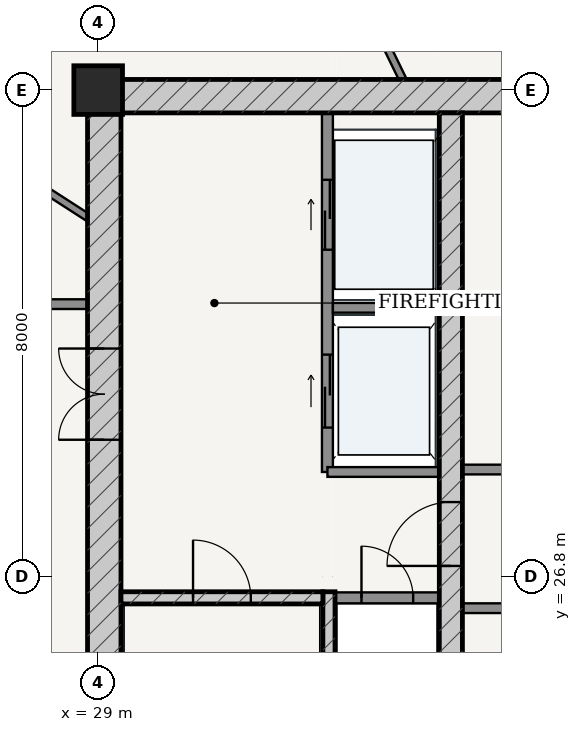
"""IFC4 building model, lengths in metres.
Left out: names, types, materials, properties, quantities, classifications, styles, units other than length and angle.
Written with IfcOpenShell. Run it as: python <this file> out.ifc"""

import sys

from ifc_helpers import new_model, si_unit, direction, frame, frame_2d, origin, origin_2d, place, context, subcontext, project, spatial, rectangle, extrude, source, transform, mapped, element, fill, save


model = new_model("IFC4")
c1 = context("Model", 3, precision=1e-05, world=origin(), true_north=direction((-0.2419218956, 0.970295726276)))
c2 = subcontext(c1, "Body", "Model", "MODEL_VIEW")
j1 = project(units=[si_unit("LENGTHUNIT", "METRE"), si_unit("PLANEANGLEUNIT", "RADIAN")], contexts=[c1])
p1 = place(None, origin())
s1 = spatial("IfcSite", under=j1, at=p1, CompositionType="ELEMENT")
p2 = place(p1, origin())
s2 = spatial("IfcBuilding", under=s1, at=p2, CompositionType="ELEMENT")
p3 = place(p2, frame((0.0, 0.0, 278.2)))
s3 = spatial("IfcBuildingStorey", under=s2, at=p3, CompositionType="ELEMENT", Elevation=278.2)
p4 = place(p3, frame((29.0, 34.8, 0.0), z_axis=(0.0, 0.0, 1.0), x_axis=(1.0, 0.0, 0.0)))
e1 = element("IfcColumn", 1, at=p4, inside=s3, PredefinedType="COLUMN", context=c2, shape_type="SweptSolid", body=[
    extrude(rectangle(XDim=0.8, YDim=0.8, at=origin_2d()), origin(), (0.0, 0.0, 1.0), 3.75),
])
p5 = place(p3, frame((28.825, 34.7, 0.0), z_axis=(0.0, 0.0, 1.0), x_axis=(1.0, 0.0, 0.0)))
e2 = element("IfcWall", 2, at=p5, inside=s3, PredefinedType="SHEAR", context=c2, shape_type="SweptSolid", body=[
    extrude(rectangle(XDim=18.35, YDim=0.55, at=frame_2d((9.175, 0.0))), origin(), (0.0, 0.0, 1.0), 3.49),
])
p6 = place(p3, frame((29.1, 19.175, 0.0), z_axis=(0.0, 0.0, 1.0), x_axis=(0.0, 1.0, 0.0)))
e3 = element("IfcWall", 3, at=p6, inside=s3, PredefinedType="SHEAR", context=c2, shape_type="SweptSolid", body=[
    extrude(rectangle(XDim=15.25, YDim=0.55, at=frame_2d((7.625, 0.0))), origin(), (0.0, 0.0, 1.0), 3.49),
])
p7 = place(p6, frame((9.875, 0.0, 0.0)))
e4 = element("IfcOpeningElement", 4, at=p7, cuts=e3, PredefinedType="OPENING", context=c2, shape_type="SweptSolid", body=[
    extrude(rectangle(XDim=1.5, YDim=2.2, at=frame_2d((0.75, 1.1))), frame((0.0, 0.285, 0.0), z_axis=(0.0, -1.0, 0.0), x_axis=(1.0, 0.0, 0.0)), (0.0, 0.0, 1.0), 0.57),
])
p8 = place(p3, frame((32.795, 19.175, 0.0), z_axis=(0.0, 0.0, 1.0), x_axis=(0.0, 1.0, 0.0)))
e5 = element("IfcWall", 5, at=p8, inside=s3, PredefinedType="SOLIDWALL", context=c2, shape_type="SweptSolid", body=[
    extrude(rectangle(XDim=7.375, YDim=0.2, at=frame_2d((3.688, 0.0))), origin(), (0.0, 0.0, 1.0), 3.49),
])
p9 = place(p3, frame((29.375, 26.45, 0.0), z_axis=(0.0, 0.0, 1.0), x_axis=(1.0, 0.0, 0.0)))
e6 = element("IfcWall", 6, at=p9, inside=s3, PredefinedType="SOLIDWALL", context=c2, shape_type="SweptSolid", body=[
    extrude(rectangle(XDim=3.32, YDim=0.2, at=frame_2d((1.66, 0.0))), origin(), (0.0, 0.0, 1.0), 3.49),
])
p10 = place(p9, frame((1.185, 0.0, 0.0)))
e7 = element("IfcOpeningElement", 7, at=p10, cuts=e6, PredefinedType="OPENING", context=c2, shape_type="SweptSolid", body=[
    extrude(rectangle(XDim=0.95, YDim=2.15, at=frame_2d((0.475, 1.075))), frame((0.0, 0.11, 0.0), z_axis=(0.0, -1.0, 0.0), x_axis=(1.0, 0.0, 0.0)), (0.0, 0.0, 1.0), 0.22),
])
p11 = place(p3, frame((34.8, 19.175, 0.0), z_axis=(0.0, 0.0, 1.0), x_axis=(0.0, 1.0, 0.0)))
e8 = element("IfcWall", 8, at=p11, inside=s3, PredefinedType="SHEAR", context=c2, shape_type="SweptSolid", body=[
    extrude(rectangle(XDim=15.25, YDim=0.38, at=frame_2d((7.625, 0.0))), origin(), (0.0, 0.0, 1.0), 3.49),
])
p12 = place(p11, frame((7.8, 0.0, 0.0)))
e9 = element("IfcOpeningElement", 9, at=p12, cuts=e8, PredefinedType="OPENING", context=c2, shape_type="SweptSolid", body=[
    extrude(rectangle(XDim=1.05, YDim=2.15, at=frame_2d((0.525, 1.075))), frame((0.0, 0.2, 0.0), z_axis=(0.0, -1.0, 0.0), x_axis=(1.0, 0.0, 0.0)), (0.0, 0.0, 1.0), 0.4),
])
p13 = place(p3, frame((32.9, 26.45, 0.0), z_axis=(0.0, 0.0, 1.0), x_axis=(1.0, 0.0, 0.0)))
e10 = element("IfcWall", 10, at=p13, inside=s3, PredefinedType="PARTITIONING", context=c2, shape_type="SweptSolid", body=[
    extrude(rectangle(XDim=1.71, YDim=0.18, at=frame_2d((0.855, 0.0))), origin(), (0.0, 0.0, 1.0), 3.49),
])
p14 = place(p13, frame((0.43, 0.0, 0.0)))
e11 = element("IfcOpeningElement", 11, at=p14, cuts=e10, PredefinedType="OPENING", context=c2, shape_type="SweptSolid", body=[
    extrude(rectangle(XDim=0.85, YDim=2.1, at=frame_2d((0.425, 1.05))), frame((0.0, 0.1, 0.0), z_axis=(0.0, -1.0, 0.0), x_axis=(1.0, 0.0, 0.0)), (0.0, 0.0, 1.0), 0.2),
])
p15 = place(p3, frame((32.77, 28.52, 0.0), z_axis=(0.0, 0.0, 1.0), x_axis=(0.0, 1.0, 0.0)))
e12 = element("IfcWall", 12, at=p15, inside=s3, PredefinedType="PARTITIONING", context=c2, shape_type="SweptSolid", body=[
    extrude(rectangle(XDim=5.905, YDim=0.18, at=frame_2d((2.953, 0.0))), origin(), (0.0, 0.0, 1.0), 3.49),
])
p16 = place(p15, frame((3.655, 0.0, 0.0)))
e13 = element("IfcOpeningElement", 13, at=p16, cuts=e12, PredefinedType="OPENING", context=c2, shape_type="SweptSolid", body=[
    extrude(rectangle(XDim=1.15, YDim=2.2, at=frame_2d((0.575, 1.1))), frame((0.0, 0.1, 0.0), z_axis=(0.0, -1.0, 0.0), x_axis=(1.0, 0.0, 0.0)), (0.0, 0.0, 1.0), 0.2),
])
p17 = place(p15, frame((0.73, 0.0, 0.0)))
e14 = element("IfcOpeningElement", 14, at=p17, cuts=e12, PredefinedType="OPENING", context=c2, shape_type="SweptSolid", body=[
    extrude(rectangle(XDim=1.2, YDim=2.25, at=frame_2d((0.6, 1.125))), frame((0.0, 0.1, 0.0), z_axis=(0.0, -1.0, 0.0), x_axis=(1.0, 0.0, 0.0)), (0.0, 0.0, 1.0), 0.2),
])
p18 = place(p3, frame((32.86, 31.22, 0.0), z_axis=(0.0, 0.0, 1.0), x_axis=(1.0, 0.0, 0.0)))
e15 = element("IfcWall", 15, at=p18, inside=s3, PredefinedType="PARTITIONING", context=c2, shape_type="SweptSolid", body=[
    extrude(rectangle(XDim=1.75, YDim=0.16, at=frame_2d((0.875, 0.0))), origin(), (0.0, 0.0, 1.0), 3.49),
])
p19 = place(p3, frame((32.77, 28.52, 0.0), z_axis=(0.0, 0.0, 1.0), x_axis=(1.0, 0.0, 0.0)))
e16 = element("IfcWall", 16, at=p19, inside=s3, PredefinedType="PARTITIONING", context=c2, shape_type="SweptSolid", body=[
    extrude(rectangle(XDim=1.84, YDim=0.16, at=frame_2d((0.92, 0.0))), origin(), (0.0, 0.0, 1.0), 3.49),
])
p20 = place(p3, frame((34.99, 28.56, 0.0), z_axis=(0.0, 0.0, 1.0), x_axis=(1.0, 0.0, 0.0)))
e17 = element("IfcWall", 17, at=p20, inside=s3, PredefinedType="PARTITIONING", context=c2, shape_type="SweptSolid", body=[
    extrude(rectangle(XDim=6.02, YDim=0.16, at=frame_2d((3.01, 0.0))), origin(), (0.0, 0.0, 1.0), 3.49),
])
p21 = place(p20, frame((1.025, 0.0, 0.0)))
e18 = element("IfcOpeningElement", 18, at=p21, cuts=e17, PredefinedType="OPENING", context=c2, shape_type="SweptSolid", body=[
    extrude(rectangle(XDim=0.86, YDim=2.1, at=frame_2d((0.43, 1.05))), frame((0.0, 0.09, 0.0), z_axis=(0.0, -1.0, 0.0), x_axis=(1.0, 0.0, 0.0)), (0.0, 0.0, 1.0), 0.18),
])
p22 = place(p20, frame((4.14, 0.0, 0.0)))
e19 = element("IfcOpeningElement", 19, at=p22, cuts=e17, PredefinedType="OPENING", context=c2, shape_type="SweptSolid", body=[
    extrude(rectangle(XDim=0.85, YDim=2.1, at=frame_2d((0.425, 1.05))), frame((0.0, 0.09, 0.0), z_axis=(0.0, -1.0, 0.0), x_axis=(1.0, 0.0, 0.0)), (0.0, 0.0, 1.0), 0.18),
])
p23 = place(p3, frame((34.99, 26.28, 0.0), z_axis=(0.0, 0.0, 1.0), x_axis=(1.0, 0.0, 0.0)))
e20 = element("IfcWall", 20, at=p23, inside=s3, PredefinedType="PARTITIONING", context=c2, shape_type="SweptSolid", body=[
    extrude(rectangle(XDim=6.02, YDim=0.16, at=frame_2d((3.01, 0.0))), origin(), (0.0, 0.0, 1.0), 3.49),
])
p24 = place(p23, frame((1.045, 0.0, 0.0)))
e21 = element("IfcOpeningElement", 21, at=p24, cuts=e20, PredefinedType="OPENING", context=c2, shape_type="SweptSolid", body=[
    extrude(rectangle(XDim=0.85, YDim=2.1, at=frame_2d((0.425, 1.05))), frame((0.0, 0.09, 0.0), z_axis=(0.0, -1.0, 0.0), x_axis=(1.0, 0.0, 0.0)), (0.0, 0.0, 1.0), 0.18),
])
p25 = place(p23, frame((3.215, 0.0, 0.0)))
e22 = element("IfcOpeningElement", 22, at=p25, cuts=e20, PredefinedType="OPENING", context=c2, shape_type="SweptSolid", body=[
    extrude(rectangle(XDim=1.1, YDim=2.2, at=frame_2d((0.55, 1.1))), frame((0.0, 0.09, 0.0), z_axis=(0.0, -1.0, 0.0), x_axis=(1.0, 0.0, 0.0)), (0.0, 0.0, 1.0), 0.18),
])
p26 = place(p23, frame((4.695, 0.0, 0.0)))
e23 = element("IfcOpeningElement", 23, at=p26, cuts=e20, PredefinedType="OPENING", context=c2, shape_type="SweptSolid", body=[
    extrude(rectangle(XDim=1.1, YDim=2.2, at=frame_2d((0.55, 1.1))), frame((0.0, 0.09, 0.0), z_axis=(0.0, -1.0, 0.0), x_axis=(1.0, 0.0, 0.0)), (0.0, 0.0, 1.0), 0.18),
])
p27 = place(p3, frame((26.895, 31.28, 0.0), z_axis=(0.0, 0.0, 1.0), x_axis=(1.0, 0.0, 0.0)))
e24 = element("IfcWall", 24, at=p27, inside=s3, PredefinedType="PARTITIONING", context=c2, shape_type="SweptSolid", body=[
    extrude(rectangle(XDim=1.93, YDim=0.16, at=frame_2d((0.965, 0.0))), origin(), (0.0, 0.0, 1.0), 3.49),
])
p28 = place(p3, frame((34.008, 34.977, 0.0), z_axis=(0.0, 0.0, 1.0), x_axis=(-0.438717914863, 0.898624833386, 0.0)))
e25 = element("IfcWall", 25, at=p28, inside=s3, PredefinedType="PARTITIONING", context=c2, shape_type="SweptSolid", body=[
    extrude(rectangle(XDim=3.007, YDim=0.12, at=frame_2d((1.504, 0.0))), origin(), (0.0, 0.0, 1.0), 3.49),
])
p29 = place(p28, frame((1.054, 0.0, 0.0)))
e26 = element("IfcOpeningElement", 26, at=p29, cuts=e25, PredefinedType="OPENING", context=c2, shape_type="SweptSolid", body=[
    extrude(rectangle(XDim=0.9, YDim=2.15, at=frame_2d((0.45, 1.075))), frame((0.0, 0.07, 0.0), z_axis=(0.0, -1.0, 0.0), x_axis=(1.0, 0.0, 0.0)), (0.0, 0.0, 1.0), 0.14),
])
p30 = place(p3, frame((28.825, 32.709, 0.0), z_axis=(0.0, 0.0, 1.0), x_axis=(-0.840692964871, 0.541512085568, 0.0)))
e27 = element("IfcWall", 27, at=p30, inside=s3, PredefinedType="PARTITIONING", context=c2, shape_type="SweptSolid", body=[
    extrude(rectangle(XDim=3.221, YDim=0.12, at=frame_2d((1.61, 0.0))), origin(), (0.0, 0.0, 1.0), 3.015),
])
p31 = place(p30, frame((1.18, 0.0, 0.0)))
e28 = element("IfcOpeningElement", 28, at=p31, cuts=e27, PredefinedType="OPENING", context=c2, shape_type="SweptSolid", body=[
    extrude(rectangle(XDim=0.86, YDim=2.15, at=frame_2d((0.43, 1.075))), frame((0.0, 0.07, 0.0), z_axis=(0.0, -1.0, 0.0), x_axis=(1.0, 0.0, 0.0)), (0.0, 0.0, 1.0), 0.14),
])
m1 = source(origin(), c2, "Body", "SweptSolid", [
    extrude(rectangle(XDim=1.5, YDim=2.2, at=frame_2d((0.75, 1.1))), frame((0.0, 0.025, 0.0), z_axis=(0.0, -1.0, 0.0), x_axis=(1.0, 0.0, 0.0)), (0.0, 0.0, 1.0), 0.05),
])
p32 = place(p7, origin())
e29 = element("IfcDoor", 29, at=p32, inside=s3, OperationType="DOUBLE_DOOR_SINGLE_SWING", PredefinedType="DOOR", context=c2, shape_type="MappedRepresentation", body=[
    mapped(m1, transform((0.0, 0.0, 0.0), scale=1.0)),
])
fill(e4, e29)
m2 = source(origin(), c2, "Body", "SweptSolid", [
    extrude(rectangle(XDim=1.05, YDim=2.15, at=frame_2d((0.525, 1.075))), frame((0.0, 0.025, 0.0), z_axis=(0.0, -1.0, 0.0), x_axis=(1.0, 0.0, 0.0)), (0.0, 0.0, 1.0), 0.05),
])
p33 = place(p12, origin())
e30 = element("IfcDoor", 30, at=p33, inside=s3, OperationType="SINGLE_SWING_LEFT", PredefinedType="DOOR", context=c2, shape_type="MappedRepresentation", body=[
    mapped(m2, transform((0.0, 0.0, 0.0), scale=1.0)),
])
fill(e9, e30)
m3 = source(origin(), c2, "Body", "SweptSolid", [
    extrude(rectangle(XDim=0.95, YDim=2.15, at=frame_2d((0.475, 1.075))), frame((0.0, 0.025, 0.0), z_axis=(0.0, -1.0, 0.0), x_axis=(1.0, 0.0, 0.0)), (0.0, 0.0, 1.0), 0.05),
])
p34 = place(p10, origin())
e31 = element("IfcDoor", 31, at=p34, inside=s3, OperationType="SINGLE_SWING_LEFT", PredefinedType="DOOR", context=c2, shape_type="MappedRepresentation", body=[
    mapped(m3, transform((0.0, 0.0, 0.0), scale=1.0)),
])
fill(e7, e31)
m4 = source(origin(), c2, "Body", "SweptSolid", [
    extrude(rectangle(XDim=0.85, YDim=2.1, at=frame_2d((0.425, 1.05))), frame((0.0, 0.025, 0.0), z_axis=(0.0, -1.0, 0.0), x_axis=(1.0, 0.0, 0.0)), (0.0, 0.0, 1.0), 0.05),
])
p35 = place(p14, origin())
e32 = element("IfcDoor", 32, at=p35, inside=s3, OperationType="SINGLE_SWING_LEFT", PredefinedType="DOOR", context=c2, shape_type="MappedRepresentation", body=[
    mapped(m4, transform((0.0, 0.0, 0.0), scale=1.0)),
])
fill(e11, e32)
m5 = source(origin(), c2, "Body", "SweptSolid", [
    extrude(rectangle(XDim=1.15, YDim=2.2, at=frame_2d((0.575, 1.1))), frame((0.0, 0.025, 0.0), z_axis=(0.0, -1.0, 0.0), x_axis=(1.0, 0.0, 0.0)), (0.0, 0.0, 1.0), 0.05),
])
p36 = place(p16, origin())
e33 = element("IfcDoor", 33, at=p36, inside=s3, OperationType="DOUBLE_DOOR_SLIDING", PredefinedType="DOOR", context=c2, shape_type="MappedRepresentation", body=[
    mapped(m5, transform((0.0, 0.0, 0.0), scale=1.0)),
])
fill(e13, e33)
m6 = source(origin(), c2, "Body", "SweptSolid", [
    extrude(rectangle(XDim=1.2, YDim=2.25, at=frame_2d((0.6, 1.125))), frame((0.0, 0.025, 0.0), z_axis=(0.0, -1.0, 0.0), x_axis=(1.0, 0.0, 0.0)), (0.0, 0.0, 1.0), 0.05),
])
p37 = place(p17, origin())
e34 = element("IfcDoor", 34, at=p37, inside=s3, OperationType="DOUBLE_DOOR_SLIDING", PredefinedType="DOOR", context=c2, shape_type="MappedRepresentation", body=[
    mapped(m6, transform((0.0, 0.0, 0.0), scale=1.0)),
])
fill(e14, e34)
save(model, sys.argv[1])
